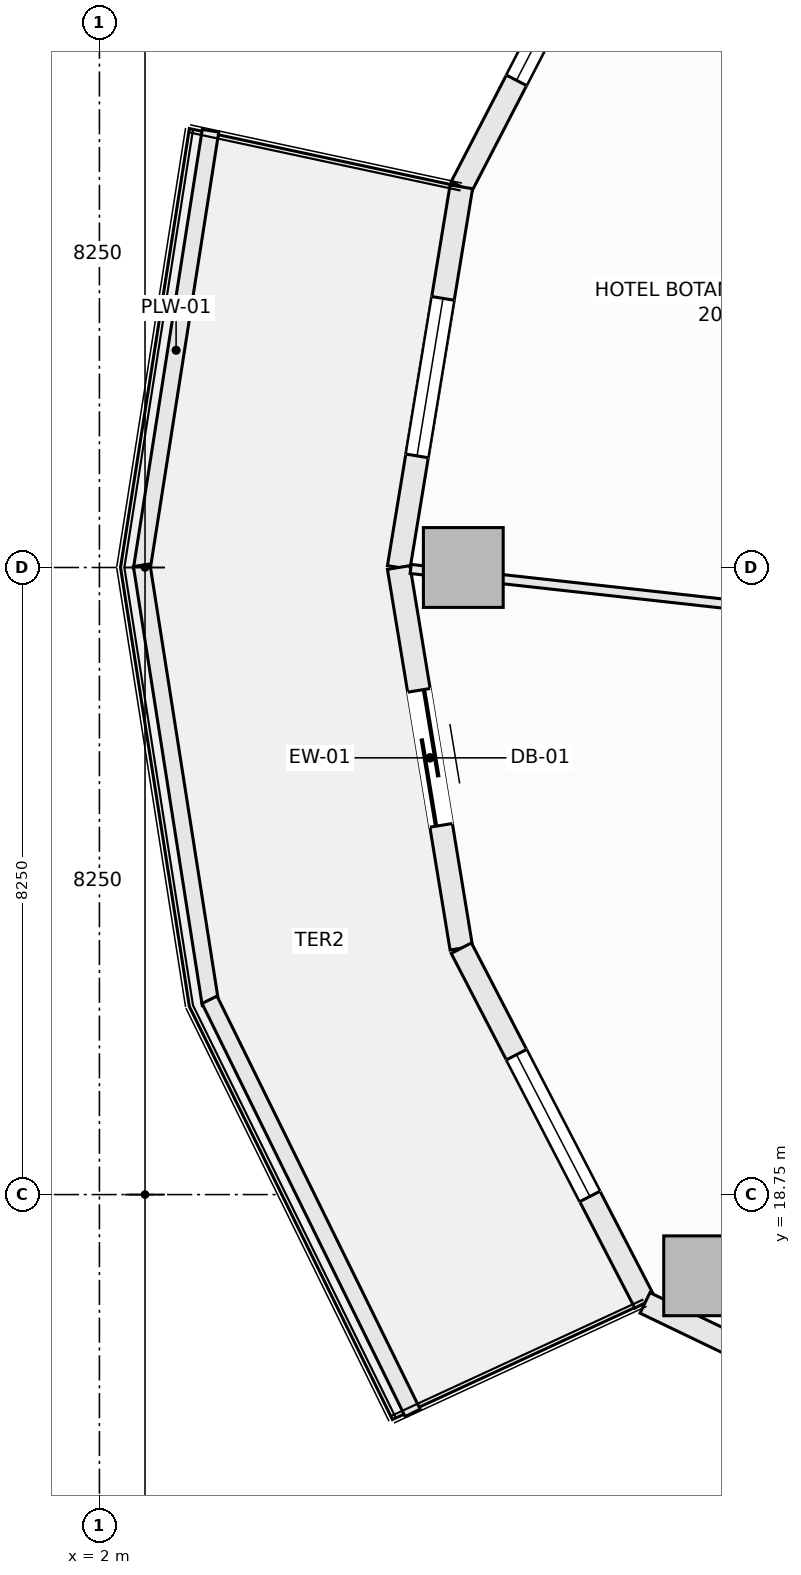
"""IFC4 building model, lengths in metres.
Left out: names, types, materials, properties, quantities, classifications, styles, units other than length and angle.
Written with IfcOpenShell. Run it as: python <this file> out.ifc"""

import sys

from ifc_helpers import new_model, si_unit, direction, frame, frame_2d, origin, origin_2d, place, context, subcontext, project, spatial, rectangle, extrude, element, fill, save


model = new_model("IFC4")
c1 = context("Model", 3, precision=1e-05, world=origin(), true_north=direction((0.0, 1.0)))
c2 = subcontext(c1, "Body", "Model", "MODEL_VIEW")
j1 = project(units=[si_unit("LENGTHUNIT", "METRE"), si_unit("PLANEANGLEUNIT", "RADIAN")], contexts=[c1])
p1 = place(None, origin())
s1 = spatial("IfcSite", under=j1, at=p1, CompositionType="ELEMENT")
p2 = place(p1, origin())
s2 = spatial("IfcBuilding", under=s1, at=p2, CompositionType="ELEMENT")
p3 = place(p2, frame((0.0, 0.0, 112.1)))
s3 = spatial("IfcBuildingStorey", under=s2, at=p3, CompositionType="ELEMENT", Elevation=112.1)
for number, where, z_axis, x_axis in (
    (1, (6.788, 27.0, -0.27), (0.0, 0.0, 1.0), (1.0, 0.0, 0.0)),
    (2, (9.95, 17.681, -0.27), (0.0, 0.0, 1.0), (1.0, 0.0, 0.0)),
):
    element("IfcColumn", number, at=place(p3, frame(where, z_axis=z_axis, x_axis=x_axis)), inside=s3, PredefinedType="COLUMN", context=c2, shape_type="SweptSolid", body=[
        extrude(rectangle(XDim=1.05, YDim=1.05, at=origin_2d()), origin(), (0.0, 0.0, 1.0), 3.4),
    ])
p4 = place(p3, frame((6.762, 32.008, 0.0), z_axis=(0.0, 0.0, 1.0), x_axis=(0.459767899643, 0.888039119892, 0.0)))
e3 = element("IfcWall", 3, at=p4, inside=s3, PredefinedType="SOLIDWALL", context=c2, shape_type="SweptSolid", body=[
    extrude(rectangle(XDim=5.255, YDim=0.3, at=frame_2d((2.628, 0.0))), origin(), (0.0, 0.0, 1.0), 2.653),
])
p5 = place(p4, frame((1.578, 0.0, 0.74)))
e4 = element("IfcOpeningElement", 4, at=p5, cuts=e3, PredefinedType="OPENING", context=c2, shape_type="SweptSolid", body=[
    extrude(rectangle(XDim=2.1, YDim=1.7, at=frame_2d((1.05, 0.85))), frame((0.0, 0.16, 0.0), z_axis=(0.0, -1.0, 0.0), x_axis=(1.0, 0.0, 0.0)), (0.0, 0.0, 1.0), 0.32),
])
p6 = place(p3, frame((5.938, 27.0, 0.0), z_axis=(0.0, 0.0, 1.0), x_axis=(0.162393944769, 0.986726003864, 0.0)))
e5 = element("IfcWall", 5, at=p6, inside=s3, PredefinedType="SOLIDWALL", context=c2, shape_type="SweptSolid", body=[
    extrude(rectangle(XDim=5.075, YDim=0.3, at=frame_2d((2.538, 0.0))), origin(), (0.0, 0.0, 1.0), 2.653),
])
p7 = place(p6, frame((1.488, 0.0, 0.74)))
e6 = element("IfcOpeningElement", 6, at=p7, cuts=e5, PredefinedType="OPENING", context=c2, shape_type="SweptSolid", body=[
    extrude(rectangle(XDim=2.1, YDim=1.7, at=frame_2d((1.05, 0.85))), frame((0.0, 0.16, 0.0), z_axis=(0.0, -1.0, 0.0), x_axis=(1.0, 0.0, 0.0)), (0.0, 0.0, 1.0), 0.32),
])
p8 = place(p3, frame((5.938, 27.0, 0.0), z_axis=(0.0, 0.0, 1.0), x_axis=(0.162393944769, -0.986726003864, 0.0)))
e7 = element("IfcWall", 7, at=p8, inside=s3, PredefinedType="SOLIDWALL", context=c2, shape_type="SweptSolid", body=[
    extrude(rectangle(XDim=5.075, YDim=0.3, at=frame_2d((2.538, 0.0))), origin(), (0.0, 0.0, 1.0), 2.653),
])
p9 = place(p8, frame((1.638, 0.0, 0.0)))
e8 = element("IfcOpeningElement", 8, at=p9, cuts=e7, PredefinedType="OPENING", context=c2, shape_type="SweptSolid", body=[
    extrude(rectangle(XDim=1.8, YDim=2.25, at=frame_2d((0.9, 1.125))), frame((0.0, 0.16, 0.0), z_axis=(0.0, -1.0, 0.0), x_axis=(1.0, 0.0, 0.0)), (0.0, 0.0, 1.0), 0.32),
])
p10 = place(p3, frame((6.762, 21.992, 0.0), z_axis=(0.0, 0.0, 1.0), x_axis=(0.459767899643, -0.888039119892, 0.0)))
e9 = element("IfcWall", 9, at=p10, inside=s3, PredefinedType="SOLIDWALL", context=c2, shape_type="SweptSolid", body=[
    extrude(rectangle(XDim=5.255, YDim=0.3, at=frame_2d((2.628, 0.0))), origin(), (0.0, 0.0, 1.0), 2.653),
])
p11 = place(p10, frame((1.578, 0.0, 0.74)))
e10 = element("IfcOpeningElement", 10, at=p11, cuts=e9, PredefinedType="OPENING", context=c2, shape_type="SweptSolid", body=[
    extrude(rectangle(XDim=2.1, YDim=1.7, at=frame_2d((1.05, 0.85))), frame((0.0, 0.16, 0.0), z_axis=(0.0, -1.0, 0.0), x_axis=(1.0, 0.0, 0.0)), (0.0, 0.0, 1.0), 0.32),
])
p12 = place(p3, frame((9.178, 17.325, 0.0), z_axis=(0.0, 0.0, 1.0), x_axis=(0.901370184739, -0.433049408339, 0.0)))
e11 = element("IfcWall", 11, at=p12, inside=s3, PredefinedType="SOLIDWALL", context=c2, shape_type="SweptSolid", body=[
    extrude(rectangle(XDim=5.884, YDim=0.3, at=frame_2d((2.942, 0.0))), origin(), (0.0, 0.0, 1.0), 2.653),
])
p13 = place(p12, frame((1.892, 0.0, 0.74)))
e12 = element("IfcOpeningElement", 12, at=p13, cuts=e11, PredefinedType="OPENING", context=c2, shape_type="SweptSolid", body=[
    extrude(rectangle(XDim=2.1, YDim=1.7, at=frame_2d((1.05, 0.85))), frame((0.0, 0.16, 0.0), z_axis=(0.0, -1.0, 0.0), x_axis=(1.0, 0.0, 0.0)), (0.0, 0.0, 1.0), 0.32),
])
for number, where, z_axis, x_axis in (
    (13, (2.556, 26.971, 0.0), (0.0, 0.0, 1.0), (0.155, 0.988, 0.0)),
    (14, (2.556, 27.029, 0.0), (0.0, 0.0, 1.0), (0.155, -0.988, 0.0)),
):
    element("IfcWall", number, at=place(p3, frame(where, z_axis=z_axis, x_axis=x_axis)), inside=s3, PredefinedType="PARAPET", context=c2, shape_type="SweptSolid", body=[
        extrude(rectangle(XDim=5.846, YDim=0.22, at=frame_2d((2.923, 0.0))), origin(), (0.0, 0.0, 1.0), 0.52),
    ])
p14 = place(p3, frame((3.449, 21.313, 0.0), z_axis=(0.0, 0.0, 1.0), x_axis=(0.441269631716, -0.897374566235, 0.0)))
e15 = element("IfcWall", 15, at=p14, inside=s3, PredefinedType="PARAPET", context=c2, shape_type="SweptSolid", body=[
    extrude(rectangle(XDim=6.056, YDim=0.22, at=frame_2d((3.028, 0.0))), origin(), (0.0, 0.0, 1.0), 0.52),
])
p15 = place(p3, frame((6.095, 26.981, 0.0), z_axis=(0.0, 0.0, 1.0), x_axis=(0.993917127708, -0.11013057363, 0.0)))
e16 = element("IfcWall", 16, at=p15, inside=s3, PredefinedType="PARTITIONING", context=c2, shape_type="SweptSolid", body=[
    extrude(rectangle(XDim=8.103, YDim=0.12, at=frame_2d((4.051, 0.0))), origin(), (0.0, 0.0, 1.0), 2.505),
])
p16 = place(p5, origin())
e17 = element("IfcWindow", 17, at=p16, inside=s3, PartitioningType="SINGLE_PANEL", PredefinedType="WINDOW", context=c2, shape_type="SweptSolid", body=[
    extrude(rectangle(XDim=2.1, YDim=1.7, at=frame_2d((1.05, 0.85))), frame((0.0, 0.03, 0.0), z_axis=(0.0, -1.0, 0.0), x_axis=(1.0, 0.0, 0.0)), (0.0, 0.0, 1.0), 0.06),
])
fill(e4, e17)
p17 = place(p7, origin())
e18 = element("IfcWindow", 18, at=p17, inside=s3, PartitioningType="SINGLE_PANEL", PredefinedType="WINDOW", context=c2, shape_type="SweptSolid", body=[
    extrude(rectangle(XDim=2.1, YDim=1.7, at=frame_2d((1.05, 0.85))), frame((0.0, 0.03, 0.0), z_axis=(0.0, -1.0, 0.0), x_axis=(1.0, 0.0, 0.0)), (0.0, 0.0, 1.0), 0.06),
])
fill(e6, e18)
p18 = place(p9, frame((1.8, 0.0, 0.0), z_axis=(0.0, 0.0, 1.0), x_axis=(-1.0, 0.0, 0.0)))
e19 = element("IfcDoor", 19, at=p18, inside=s3, OperationType="SLIDING_TO_LEFT", PredefinedType="DOOR", context=c2, shape_type="SweptSolid", body=[
    extrude(rectangle(XDim=1.8, YDim=2.25, at=frame_2d((0.9, 1.125))), frame((0.0, 0.025, 0.0), z_axis=(0.0, -1.0, 0.0), x_axis=(1.0, 0.0, 0.0)), (0.0, 0.0, 1.0), 0.05),
])
fill(e8, e19)
p19 = place(p11, origin())
e20 = element("IfcWindow", 20, at=p19, inside=s3, PartitioningType="SINGLE_PANEL", PredefinedType="WINDOW", context=c2, shape_type="SweptSolid", body=[
    extrude(rectangle(XDim=2.1, YDim=1.7, at=frame_2d((1.05, 0.85))), frame((0.0, 0.03, 0.0), z_axis=(0.0, -1.0, 0.0), x_axis=(1.0, 0.0, 0.0)), (0.0, 0.0, 1.0), 0.06),
])
fill(e10, e20)
save(model, sys.argv[1])
